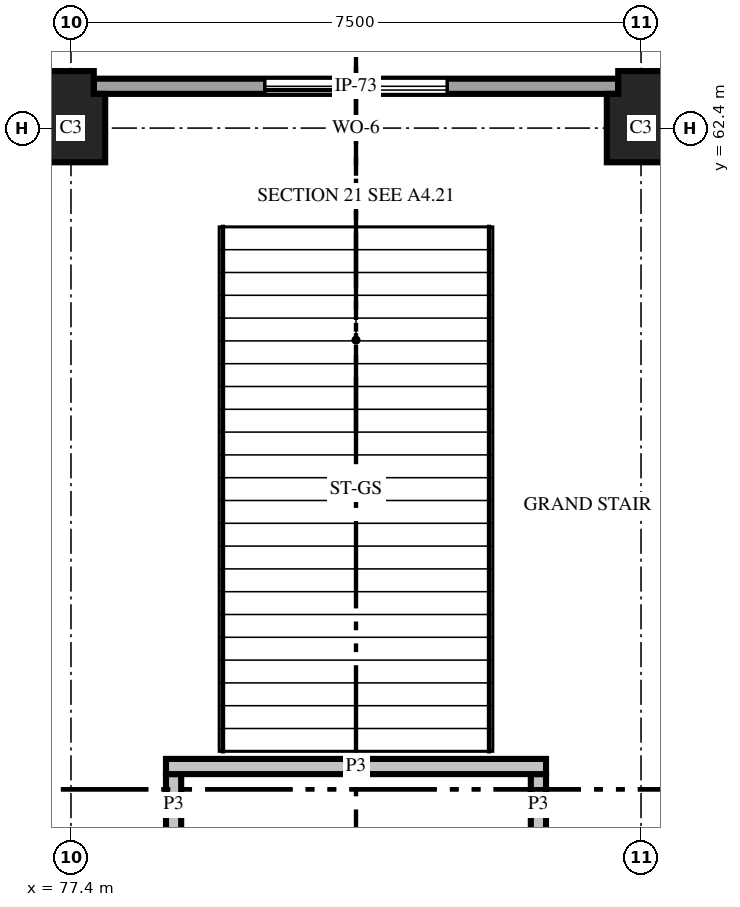
"""IFC4 building model, lengths in metres.
Left out: names, types, materials, properties, quantities, classifications, styles, units other than length and angle.
Written with IfcOpenShell. Run it as: python <this file> out.ifc"""

import sys

from ifc_helpers import new_model, si_unit, direction, frame, frame_2d, origin, place, context, subcontext, project, spatial, polyline, rectangle, outline, extrude, element, fill, save


model = new_model("IFC4")
c1 = context("Model", 3, precision=1e-05, world=origin(), true_north=direction((0.0, 1.0)))
c2 = subcontext(c1, "Body", "Model", "MODEL_VIEW")
j1 = project(units=[si_unit("LENGTHUNIT", "METRE"), si_unit("PLANEANGLEUNIT", "RADIAN")], contexts=[c1])
p1 = place(None, origin())
s1 = spatial("IfcSite", under=j1, at=p1, CompositionType="ELEMENT")
p2 = place(p1, origin())
s2 = spatial("IfcBuilding", under=s1, at=p2, CompositionType="ELEMENT")
p3 = place(p2, origin())
s3 = spatial("IfcBuildingStorey", under=s2, at=p3, CompositionType="ELEMENT", Elevation=0.0)
for number, where, z_axis, x_axis in (
    (1, (77.4, 62.4, 0.0), (0.0, 0.0, 1.0), (0.0, 1.0, 0.0)),
    (2, (84.9, 62.4, 0.0), (0.0, 0.0, 1.0), (0.0, 1.0, 0.0)),
):
    element("IfcColumn", number, at=place(p3, frame(where, z_axis=z_axis, x_axis=x_axis)), inside=s3, PredefinedType="COLUMN", context=c2, shape_type="SweptSolid", body=[
        extrude(outline(polyline([(-0.45, -0.45), (0.45, -0.45), (0.45, -0.3), (0.75, -0.3), (0.75, 0.3), (0.45, 0.3), (0.45, 0.45), (-0.45, 0.45), (-0.45, -0.45)])), origin(), (0.0, 0.0, 1.0), 4.5),
    ])
p4 = place(p3, frame((84.6, 62.95, 0.0), z_axis=(0.0, 0.0, 1.0), x_axis=(-1.0, 0.0, 0.0)))
e3 = element("IfcWall", 3, at=p4, inside=s3, PredefinedType="SOLIDWALL", context=c2, shape_type="SweptSolid", body=[
    extrude(outline(polyline([(0.0, 0.0), (6.9, 0.0), (6.9, 3.1), (6.002, 3.1), (6.0, 2.4), (5.681, 2.56), (5.363, 2.695), (5.044, 2.806), (4.725, 2.895), (4.406, 2.963), (4.087, 3.012), (3.769, 3.041), (3.45, 3.05), (3.131, 3.041), (2.812, 3.012), (2.494, 2.963), (2.175, 2.895), (1.856, 2.806), (1.538, 2.695), (1.219, 2.56), (0.9, 2.4), (0.898, 3.1), (0.0, 3.1), (0.0, 0.0)])), frame((0.0, 0.1, 0.0), z_axis=(0.0, -1.0, 0.0), x_axis=(1.0, 0.0, 0.0)), (0.0, 0.0, 1.0), 0.2),
])
p5 = place(p4, frame((2.25, 0.0, 0.0)))
e4 = element("IfcOpeningElement", 4, at=p5, cuts=e3, PredefinedType="OPENING", context=c2, shape_type="SweptSolid", body=[
    extrude(rectangle(XDim=2.4, YDim=2.1, at=frame_2d((1.2, 1.05))), frame((0.0, 0.11, 0.0), z_axis=(0.0, -1.0, 0.0), x_axis=(1.0, 0.0, 0.0)), (0.0, 0.0, 1.0), 0.22),
])
p6 = place(p4, frame((2.25, 0.0, 2.25)))
e5 = element("IfcOpeningElement", 5, at=p6, cuts=e3, PredefinedType="OPENING", context=c2, shape_type="SweptSolid", body=[
    extrude(rectangle(XDim=2.4, YDim=0.563, at=frame_2d((1.2, 0.281))), frame((0.0, 0.11, 0.0), z_axis=(0.0, -1.0, 0.0), x_axis=(1.0, 0.0, 0.0)), (0.0, 0.0, 1.0), 0.22),
])
for number, where, z_axis, x_axis in (
    (6, (83.55, 53.1, 0.0), (0.0, 0.0, 1.0), (0.0, 1.0, 0.0)),
    (7, (78.75, 53.9, 0.0), (0.0, 0.0, 1.0), (0.0, -1.0, 0.0)),
):
    element("IfcWall", number, at=place(p3, frame(where, z_axis=z_axis, x_axis=x_axis)), inside=s3, PredefinedType="PARTITIONING", context=c2, shape_type="SweptSolid", body=[
        extrude(rectangle(XDim=0.8, YDim=0.2, at=frame_2d((0.4, 0.0))), origin(), (0.0, 0.0, 1.0), 3.68),
    ])
p7 = place(p3, frame((83.65, 54.0, 0.0), z_axis=(0.0, 0.0, 1.0), x_axis=(-1.0, 0.0, 0.0)))
e8 = element("IfcWall", 8, at=p7, inside=s3, PredefinedType="PARTITIONING", context=c2, shape_type="SweptSolid", body=[
    extrude(rectangle(XDim=5.0, YDim=0.2, at=frame_2d((2.5, 0.0))), origin(), (0.0, 0.0, 1.0), 3.68),
])
p8 = place(p5, frame((2.4, 0.0, 0.0), z_axis=(0.0, 0.0, 1.0), x_axis=(-1.0, 0.0, 0.0)))
e9 = element("IfcDoor", 9, at=p8, inside=s3, OperationType="DOUBLE_DOOR_SLIDING", PredefinedType="DOOR", context=c2, shape_type="SweptSolid", body=[
    extrude(rectangle(XDim=2.4, YDim=2.1, at=frame_2d((1.2, 1.05))), frame((0.0, 0.025, 0.0), z_axis=(0.0, -1.0, 0.0), x_axis=(1.0, 0.0, 0.0)), (0.0, 0.0, 1.0), 0.05),
])
fill(e4, e9)
p9 = place(p6, origin())
e10 = element("IfcWindow", 10, at=p9, inside=s3, PartitioningType="SINGLE_PANEL", PredefinedType="WINDOW", context=c2, shape_type="SweptSolid", body=[
    extrude(rectangle(XDim=2.4, YDim=0.563, at=frame_2d((1.2, 0.281))), frame((0.0, 0.03, 0.0), z_axis=(0.0, -1.0, 0.0), x_axis=(1.0, 0.0, 0.0)), (0.0, 0.0, 1.0), 0.06),
])
fill(e5, e10)
save(model, sys.argv[1])
